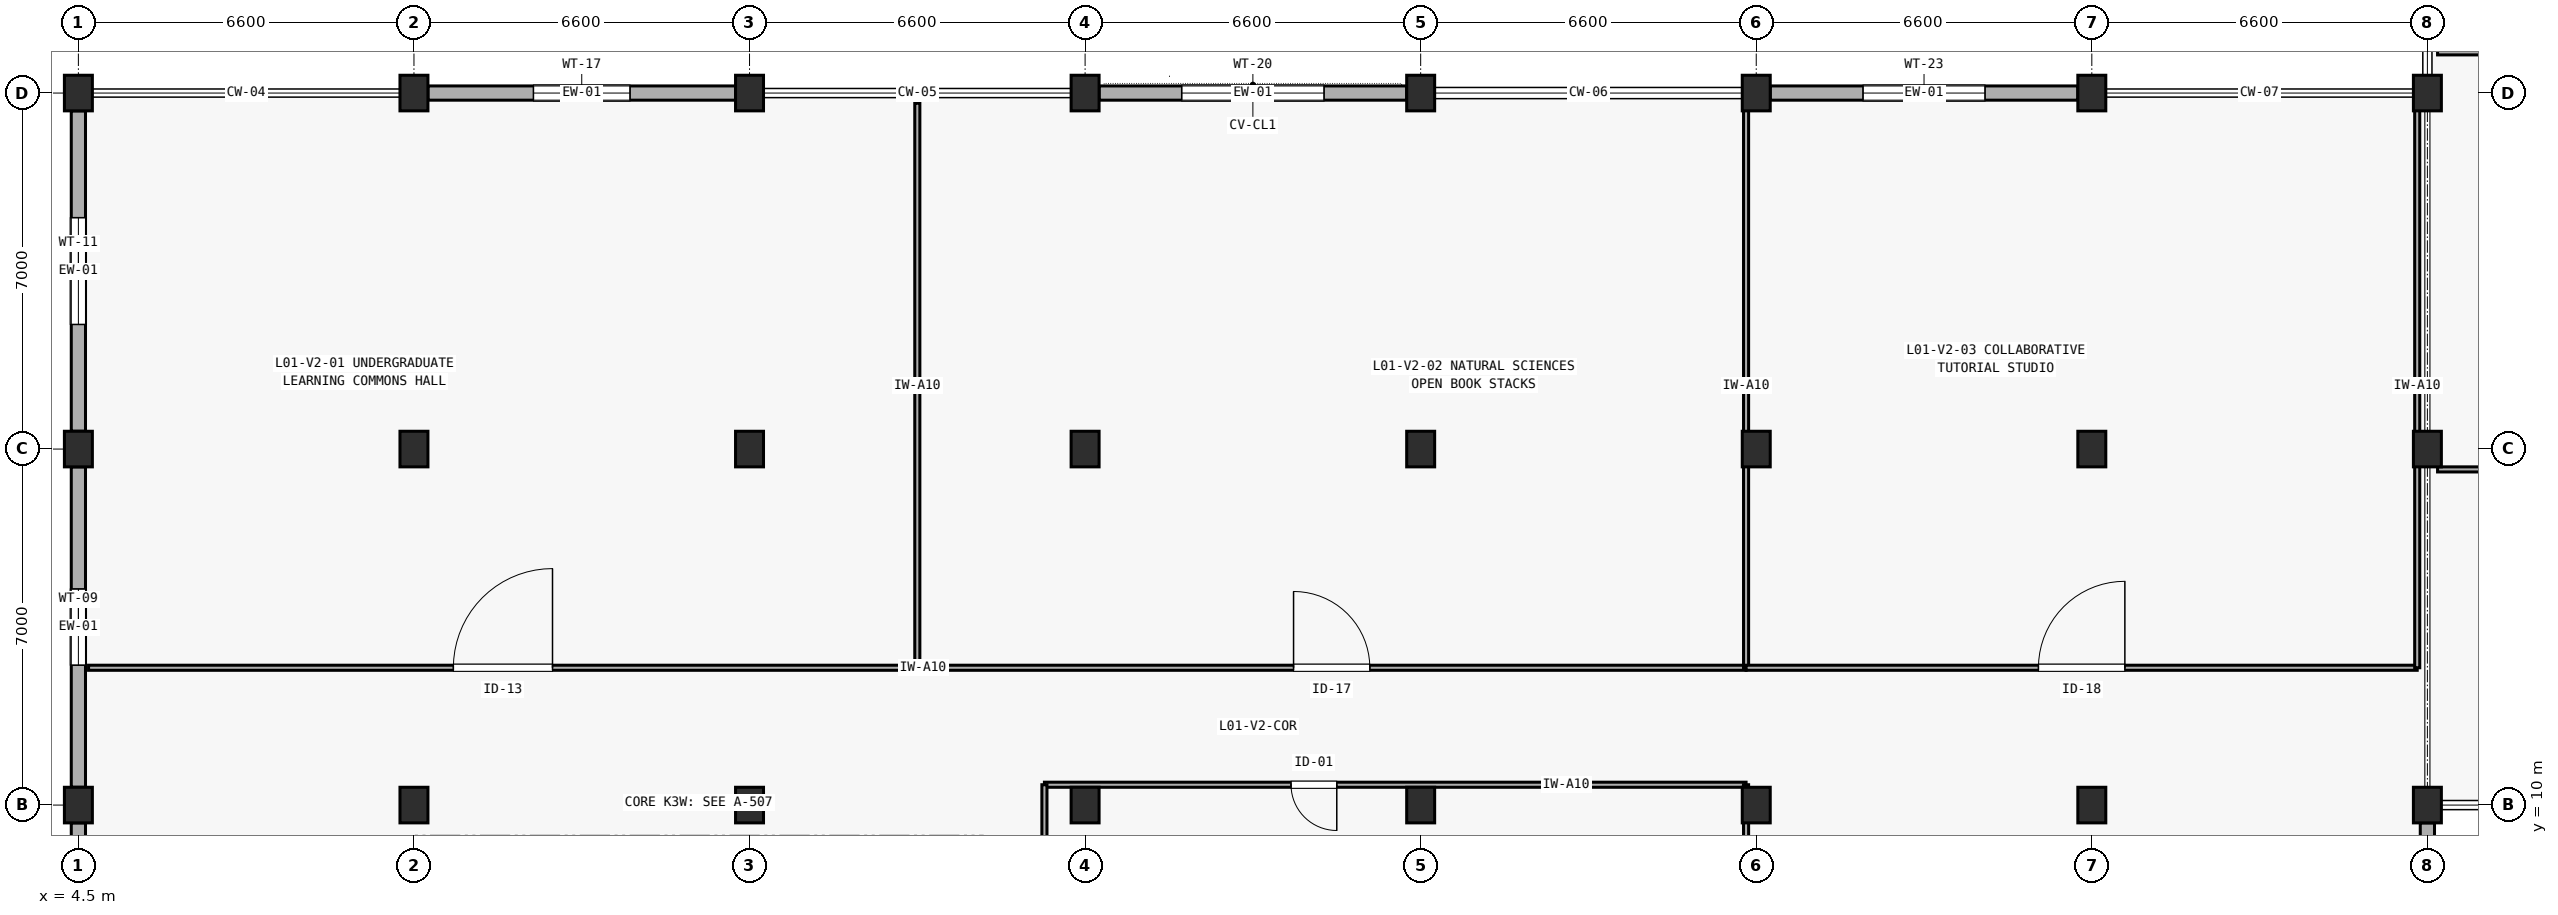
"""IFC4 building model, lengths in metres.
Left out: names, types, materials, properties, quantities, classifications, styles, units other than length and angle.
Written with IfcOpenShell. Run it as: python <this file> out.ifc"""

import sys

from ifc_helpers import new_model, si_unit, direction, frame, frame_2d, origin, origin_2d, place, context, subcontext, project, spatial, rectangle, extrude, element, fill, save


model = new_model("IFC4")
c1 = context("Model", 3, precision=1e-05, world=origin(), true_north=direction((0.0, 1.0)))
c2 = subcontext(c1, "Body", "Model", "MODEL_VIEW")
j1 = project(units=[si_unit("LENGTHUNIT", "METRE"), si_unit("PLANEANGLEUNIT", "RADIAN")], contexts=[c1])
p1 = place(None, origin())
s1 = spatial("IfcSite", under=j1, at=p1, CompositionType="ELEMENT")
p2 = place(p1, origin())
s2 = spatial("IfcBuilding", under=s1, at=p2, CompositionType="ELEMENT")
p3 = place(p2, frame((0.0, 0.0, 4.2)))
s3 = spatial("IfcBuildingStorey", under=s2, at=p3, CompositionType="ELEMENT", Elevation=4.2)
for number, where, z_axis, x_axis in (
    (1, (4.5, 10.0, 0.0), (0.0, 0.0, 1.0), (1.0, 0.0, 0.0)),
    (2, (4.5, 17.0, 0.0), (0.0, 0.0, 1.0), (1.0, 0.0, 0.0)),
    (3, (4.5, 24.0, 0.0), (0.0, 0.0, 1.0), (1.0, 0.0, 0.0)),
    (4, (11.1, 10.0, 0.0), (0.0, 0.0, 1.0), (1.0, 0.0, 0.0)),
    (5, (11.1, 17.0, 0.0), (0.0, 0.0, 1.0), (1.0, 0.0, 0.0)),
    (6, (11.1, 24.0, 0.0), (0.0, 0.0, 1.0), (1.0, 0.0, 0.0)),
    (7, (17.7, 10.0, 0.0), (0.0, 0.0, 1.0), (1.0, 0.0, 0.0)),
    (8, (17.7, 17.0, 0.0), (0.0, 0.0, 1.0), (1.0, 0.0, 0.0)),
    (9, (17.7, 24.0, 0.0), (0.0, 0.0, 1.0), (1.0, 0.0, 0.0)),
    (10, (24.3, 10.0, 0.0), (0.0, 0.0, 1.0), (1.0, 0.0, 0.0)),
    (11, (24.3, 17.0, 0.0), (0.0, 0.0, 1.0), (1.0, 0.0, 0.0)),
    (12, (24.3, 24.0, 0.0), (0.0, 0.0, 1.0), (1.0, 0.0, 0.0)),
    (13, (30.9, 10.0, 0.0), (0.0, 0.0, 1.0), (1.0, 0.0, 0.0)),
    (14, (30.9, 17.0, 0.0), (0.0, 0.0, 1.0), (1.0, 0.0, 0.0)),
    (15, (30.9, 24.0, 0.0), (0.0, 0.0, 1.0), (1.0, 0.0, 0.0)),
    (16, (37.5, 10.0, 0.0), (0.0, 0.0, 1.0), (1.0, 0.0, 0.0)),
    (17, (37.5, 17.0, 0.0), (0.0, 0.0, 1.0), (1.0, 0.0, 0.0)),
    (18, (37.5, 24.0, 0.0), (0.0, 0.0, 1.0), (1.0, 0.0, 0.0)),
    (19, (44.1, 10.0, 0.0), (0.0, 0.0, 1.0), (1.0, 0.0, 0.0)),
    (20, (44.1, 17.0, 0.0), (0.0, 0.0, 1.0), (1.0, 0.0, 0.0)),
    (21, (44.1, 24.0, 0.0), (0.0, 0.0, 1.0), (1.0, 0.0, 0.0)),
    (22, (50.7, 10.0, 0.0), (0.0, 0.0, 1.0), (1.0, 0.0, 0.0)),
    (23, (50.7, 17.0, 0.0), (0.0, 0.0, 1.0), (1.0, 0.0, 0.0)),
    (24, (50.7, 24.0, 0.0), (0.0, 0.0, 1.0), (1.0, 0.0, 0.0)),
):
    element("IfcColumn", number, at=place(p3, frame(where, z_axis=z_axis, x_axis=x_axis)), inside=s3, PredefinedType="COLUMN", context=c2, shape_type="SweptSolid", body=[
        extrude(rectangle(XDim=0.55, YDim=0.7, at=origin_2d()), origin(), (0.0, 0.0, 1.0), 4.2),
    ])
p4 = place(p3, frame((11.375, 24.0, 0.0), z_axis=(0.0, 0.0, 1.0), x_axis=(1.0, 0.0, 0.0)))
e25 = element("IfcWall", 25, at=p4, inside=s3, PredefinedType="SOLIDWALL", context=c2, shape_type="SweptSolid", body=[
    extrude(rectangle(XDim=6.05, YDim=0.28, at=frame_2d((3.025, 0.0))), origin(), (0.0, 0.0, 1.0), 3.235),
])
p5 = place(p4, frame((2.075, 0.0, 0.85)))
e26 = element("IfcOpeningElement", 26, at=p5, cuts=e25, PredefinedType="OPENING", context=c2, shape_type="SweptSolid", body=[
    extrude(rectangle(XDim=1.9, YDim=1.25, at=frame_2d((0.95, 0.625))), frame((0.0, 0.15, 0.0), z_axis=(0.0, -1.0, 0.0), x_axis=(1.0, 0.0, 0.0)), (0.0, 0.0, 1.0), 0.3),
])
p6 = place(p3, frame((24.575, 24.0, 0.0), z_axis=(0.0, 0.0, 1.0), x_axis=(1.0, 0.0, 0.0)))
e27 = element("IfcWall", 27, at=p6, inside=s3, PredefinedType="SOLIDWALL", context=c2, shape_type="SweptSolid", body=[
    extrude(rectangle(XDim=6.05, YDim=0.28, at=frame_2d((3.025, 0.0))), origin(), (0.0, 0.0, 1.0), 3.285),
])
p7 = place(p6, frame((1.625, 0.0, 0.85)))
e28 = element("IfcOpeningElement", 28, at=p7, cuts=e27, PredefinedType="OPENING", context=c2, shape_type="SweptSolid", body=[
    extrude(rectangle(XDim=2.8, YDim=1.25, at=frame_2d((1.4, 0.625))), frame((0.0, 0.15, 0.0), z_axis=(0.0, -1.0, 0.0), x_axis=(1.0, 0.0, 0.0)), (0.0, 0.0, 1.0), 0.3),
])
p8 = place(p3, frame((37.775, 24.0, 0.0), z_axis=(0.0, 0.0, 1.0), x_axis=(1.0, 0.0, 0.0)))
e29 = element("IfcWall", 29, at=p8, inside=s3, PredefinedType="SOLIDWALL", context=c2, shape_type="SweptSolid", body=[
    extrude(rectangle(XDim=6.05, YDim=0.28, at=frame_2d((3.025, 0.0))), origin(), (0.0, 0.0, 1.0), 3.385),
])
p9 = place(p8, frame((1.825, 0.0, 0.85)))
e30 = element("IfcOpeningElement", 30, at=p9, cuts=e29, PredefinedType="OPENING", context=c2, shape_type="SweptSolid", body=[
    extrude(rectangle(XDim=2.4, YDim=1.6, at=frame_2d((1.2, 0.8))), frame((0.0, 0.15, 0.0), z_axis=(0.0, -1.0, 0.0), x_axis=(1.0, 0.0, 0.0)), (0.0, 0.0, 1.0), 0.3),
])
p10 = place(p3, frame((4.5, 3.35, 0.0), z_axis=(0.0, 0.0, 1.0), x_axis=(0.0, 1.0, 0.0)))
e31 = element("IfcWall", 31, at=p10, inside=s3, PredefinedType="SOLIDWALL", context=c2, shape_type="SweptSolid", body=[
    extrude(rectangle(XDim=6.3, YDim=0.28, at=frame_2d((3.15, 0.0))), origin(), (0.0, 0.0, 1.0), 3.565),
])
p11 = place(p10, frame((1.95, 0.0, 0.85)))
e32 = element("IfcOpeningElement", 32, at=p11, cuts=e31, PredefinedType="OPENING", context=c2, shape_type="SweptSolid", body=[
    extrude(rectangle(XDim=2.4, YDim=1.35, at=frame_2d((1.2, 0.675))), frame((0.0, 0.15, 0.0), z_axis=(0.0, -1.0, 0.0), x_axis=(1.0, 0.0, 0.0)), (0.0, 0.0, 1.0), 0.3),
])
p12 = place(p3, frame((4.5, 10.35, 0.0), z_axis=(0.0, 0.0, 1.0), x_axis=(0.0, 1.0, 0.0)))
e33 = element("IfcWall", 33, at=p12, inside=s3, PredefinedType="SOLIDWALL", context=c2, shape_type="SweptSolid", body=[
    extrude(rectangle(XDim=6.3, YDim=0.28, at=frame_2d((3.15, 0.0))), origin(), (0.0, 0.0, 1.0), 3.565),
])
p13 = place(p12, frame((2.4, 0.0, 0.85)))
e34 = element("IfcOpeningElement", 34, at=p13, cuts=e33, PredefinedType="OPENING", context=c2, shape_type="SweptSolid", body=[
    extrude(rectangle(XDim=1.5, YDim=1.5, at=frame_2d((0.75, 0.75))), frame((0.0, 0.15, 0.0), z_axis=(0.0, -1.0, 0.0), x_axis=(1.0, 0.0, 0.0)), (0.0, 0.0, 1.0), 0.3),
])
p14 = place(p3, frame((4.5, 17.35, 0.0), z_axis=(0.0, 0.0, 1.0), x_axis=(0.0, 1.0, 0.0)))
e35 = element("IfcWall", 35, at=p14, inside=s3, PredefinedType="SOLIDWALL", context=c2, shape_type="SweptSolid", body=[
    extrude(rectangle(XDim=6.3, YDim=0.28, at=frame_2d((3.15, 0.0))), origin(), (0.0, 0.0, 1.0), 3.565),
])
p15 = place(p14, frame((2.1, 0.0, 0.85)))
e36 = element("IfcOpeningElement", 36, at=p15, cuts=e35, PredefinedType="OPENING", context=c2, shape_type="SweptSolid", body=[
    extrude(rectangle(XDim=2.1, YDim=1.5, at=frame_2d((1.05, 0.75))), frame((0.0, 0.15, 0.0), z_axis=(0.0, -1.0, 0.0), x_axis=(1.0, 0.0, 0.0)), (0.0, 0.0, 1.0), 0.3),
])
p16 = place(p3, frame((50.7, 3.35, 0.0), z_axis=(0.0, 0.0, 1.0), x_axis=(0.0, 1.0, 0.0)))
e37 = element("IfcWall", 37, at=p16, inside=s3, PredefinedType="SOLIDWALL", context=c2, shape_type="SweptSolid", body=[
    extrude(rectangle(XDim=6.3, YDim=0.28, at=frame_2d((3.15, 0.0))), origin(), (0.0, 0.0, 1.0), 3.465),
])
p17 = place(p16, frame((1.8, 0.0, 0.85)))
e38 = element("IfcOpeningElement", 38, at=p17, cuts=e37, PredefinedType="OPENING", context=c2, shape_type="SweptSolid", body=[
    extrude(rectangle(XDim=2.7, YDim=1.5, at=frame_2d((1.35, 0.75))), frame((0.0, 0.15, 0.0), z_axis=(0.0, -1.0, 0.0), x_axis=(1.0, 0.0, 0.0)), (0.0, 0.0, 1.0), 0.3),
])
p18 = place(p3, frame((4.7, 12.7, 0.0), z_axis=(0.0, 0.0, 1.0), x_axis=(1.0, 0.0, 0.0)))
e39 = element("IfcWall", 39, at=p18, inside=s3, PredefinedType="PARTITIONING", context=c2, shape_type="SweptSolid", body=[
    extrude(rectangle(XDim=16.3, YDim=0.1, at=frame_2d((8.15, 0.0))), origin(), (0.0, 0.0, 1.0), 3.9),
])
p19 = place(p18, frame((7.175, 0.0, 0.0)))
e40 = element("IfcOpeningElement", 40, at=p19, cuts=e39, PredefinedType="OPENING", context=c2, shape_type="SweptSolid", body=[
    extrude(rectangle(XDim=1.95, YDim=2.3, at=frame_2d((0.975, 1.15))), frame((0.0, 0.06, 0.0), z_axis=(0.0, -1.0, 0.0), x_axis=(1.0, 0.0, 0.0)), (0.0, 0.0, 1.0), 0.12),
])
p20 = place(p3, frame((21.0, 12.7, 0.0), z_axis=(0.0, 0.0, 1.0), x_axis=(0.0, 1.0, 0.0)))
e41 = element("IfcWall", 41, at=p20, inside=s3, PredefinedType="PARTITIONING", context=c2, shape_type="SweptSolid", body=[
    extrude(rectangle(XDim=11.1, YDim=0.1, at=frame_2d((5.55, 0.0))), origin(), (0.0, 0.0, 1.0), 3.618),
])
p21 = place(p3, frame((21.0, 12.7, 0.0), z_axis=(0.0, 0.0, 1.0), x_axis=(1.0, 0.0, 0.0)))
e42 = element("IfcWall", 42, at=p21, inside=s3, PredefinedType="PARTITIONING", context=c2, shape_type="SweptSolid", body=[
    extrude(rectangle(XDim=16.3, YDim=0.1, at=frame_2d((8.15, 0.0))), origin(), (0.0, 0.0, 1.0), 3.9),
])
p22 = place(p21, frame((7.4, 0.0, 0.0)))
e43 = element("IfcOpeningElement", 43, at=p22, cuts=e42, PredefinedType="OPENING", context=c2, shape_type="SweptSolid", body=[
    extrude(rectangle(XDim=1.5, YDim=2.15, at=frame_2d((0.75, 1.075))), frame((0.0, 0.06, 0.0), z_axis=(0.0, -1.0, 0.0), x_axis=(1.0, 0.0, 0.0)), (0.0, 0.0, 1.0), 0.12),
])
p23 = place(p3, frame((37.3, 12.7, 0.0), z_axis=(0.0, 0.0, 1.0), x_axis=(0.0, 1.0, 0.0)))
e44 = element("IfcWall", 44, at=p23, inside=s3, PredefinedType="PARTITIONING", context=c2, shape_type="SweptSolid", body=[
    extrude(rectangle(XDim=11.1, YDim=0.1, at=frame_2d((5.55, 0.0))), origin(), (0.0, 0.0, 1.0), 3.445),
])
p24 = place(p3, frame((37.3, 12.7, 0.0), z_axis=(0.0, 0.0, 1.0), x_axis=(1.0, 0.0, 0.0)))
e45 = element("IfcWall", 45, at=p24, inside=s3, PredefinedType="PARTITIONING", context=c2, shape_type="SweptSolid", body=[
    extrude(rectangle(XDim=13.2, YDim=0.1, at=frame_2d((6.6, 0.0))), origin(), (0.0, 0.0, 1.0), 3.9),
])
p25 = place(p24, frame((5.75, 0.0, 0.0)))
e46 = element("IfcOpeningElement", 46, at=p25, cuts=e45, PredefinedType="OPENING", context=c2, shape_type="SweptSolid", body=[
    extrude(rectangle(XDim=1.7, YDim=2.2, at=frame_2d((0.85, 1.1))), frame((0.0, 0.06, 0.0), z_axis=(0.0, -1.0, 0.0), x_axis=(1.0, 0.0, 0.0)), (0.0, 0.0, 1.0), 0.12),
])
p26 = place(p3, frame((50.5, 12.7, 0.0), z_axis=(0.0, 0.0, 1.0), x_axis=(0.0, 1.0, 0.0)))
e47 = element("IfcWall", 47, at=p26, inside=s3, PredefinedType="PARTITIONING", context=c2, shape_type="SweptSolid", body=[
    extrude(rectangle(XDim=11.1, YDim=0.1, at=frame_2d((5.55, 0.0))), origin(), (0.0, 0.0, 1.0), 3.445),
])
p27 = place(p3, frame((23.5, 10.4, 0.0), z_axis=(0.0, 0.0, 1.0), x_axis=(1.0, 0.0, 0.0)))
e48 = element("IfcWall", 48, at=p27, inside=s3, PredefinedType="PARTITIONING", context=c2, shape_type="SweptSolid", body=[
    extrude(rectangle(XDim=13.8, YDim=0.1, at=frame_2d((6.9, 0.0))), origin(), (0.0, 0.0, 1.0), 3.9),
])
p28 = place(p27, frame((4.85, 0.0, 0.0)))
e49 = element("IfcOpeningElement", 49, at=p28, cuts=e48, PredefinedType="OPENING", context=c2, shape_type="SweptSolid", body=[
    extrude(rectangle(XDim=0.9, YDim=2.1, at=frame_2d((0.45, 1.05))), frame((0.0, 0.06, 0.0), z_axis=(0.0, -1.0, 0.0), x_axis=(1.0, 0.0, 0.0)), (0.0, 0.0, 1.0), 0.12),
])
for number, where, z_axis, x_axis in (
    (50, (23.5, 3.2, 0.0), (0.0, 0.0, 1.0), (0.0, 1.0, 0.0)),
    (51, (37.3, 3.2, 0.0), (0.0, 0.0, 1.0), (0.0, 1.0, 0.0)),
):
    element("IfcWall", number, at=place(p3, frame(where, z_axis=z_axis, x_axis=x_axis)), inside=s3, PredefinedType="PARTITIONING", context=c2, shape_type="SweptSolid", body=[
        extrude(rectangle(XDim=7.2, YDim=0.1, at=frame_2d((3.6, 0.0))), origin(), (0.0, 0.0, 1.0), 3.9),
    ])
p29 = place(p3, frame((50.9, 16.6, 0.0), z_axis=(0.0, 0.0, 1.0), x_axis=(1.0, 0.0, 0.0)))
e52 = element("IfcWall", 52, at=p29, inside=s3, PredefinedType="PARTITIONING", context=c2, shape_type="SweptSolid", body=[
    extrude(rectangle(XDim=16.6, YDim=0.1, at=frame_2d((8.3, 0.0))), origin(), (0.0, 0.0, 1.0), 3.135),
])
p30 = place(p3, frame((50.9, 24.8, 0.0), z_axis=(0.0, 0.0, 1.0), x_axis=(1.0, 0.0, 0.0)))
e53 = element("IfcWall", 53, at=p30, inside=s3, PredefinedType="PARTITIONING", context=c2, shape_type="SweptSolid", body=[
    extrude(rectangle(XDim=16.6, YDim=0.1, at=frame_2d((8.3, 0.0))), origin(), (0.0, 0.0, 1.0), 3.9),
])
p31 = place(p30, frame((7.875, 0.0, 0.0)))
e54 = element("IfcOpeningElement", 54, at=p31, cuts=e53, PredefinedType="OPENING", context=c2, shape_type="SweptSolid", body=[
    extrude(rectangle(XDim=1.25, YDim=2.15, at=frame_2d((0.625, 1.075))), frame((0.0, 0.06, 0.0), z_axis=(0.0, -1.0, 0.0), x_axis=(1.0, 0.0, 0.0)), (0.0, 0.0, 1.0), 0.12),
])
p32 = place(p5, origin())
e55 = element("IfcWindow", 55, at=p32, inside=s3, PartitioningType="SINGLE_PANEL", PredefinedType="WINDOW", context=c2, shape_type="SweptSolid", body=[
    extrude(rectangle(XDim=1.9, YDim=1.25, at=frame_2d((0.95, 0.625))), frame((0.0, 0.03, 0.0), z_axis=(0.0, -1.0, 0.0), x_axis=(1.0, 0.0, 0.0)), (0.0, 0.0, 1.0), 0.06),
])
fill(e26, e55)
p33 = place(p7, origin())
e56 = element("IfcWindow", 56, at=p33, inside=s3, PartitioningType="SINGLE_PANEL", PredefinedType="WINDOW", context=c2, shape_type="SweptSolid", body=[
    extrude(rectangle(XDim=2.8, YDim=1.25, at=frame_2d((1.4, 0.625))), frame((0.0, 0.03, 0.0), z_axis=(0.0, -1.0, 0.0), x_axis=(1.0, 0.0, 0.0)), (0.0, 0.0, 1.0), 0.06),
])
fill(e28, e56)
p34 = place(p9, origin())
e57 = element("IfcWindow", 57, at=p34, inside=s3, PartitioningType="SINGLE_PANEL", PredefinedType="WINDOW", context=c2, shape_type="SweptSolid", body=[
    extrude(rectangle(XDim=2.4, YDim=1.6, at=frame_2d((1.2, 0.8))), frame((0.0, 0.03, 0.0), z_axis=(0.0, -1.0, 0.0), x_axis=(1.0, 0.0, 0.0)), (0.0, 0.0, 1.0), 0.06),
])
fill(e30, e57)
p35 = place(p13, origin())
e58 = element("IfcWindow", 58, at=p35, inside=s3, PartitioningType="SINGLE_PANEL", PredefinedType="WINDOW", context=c2, shape_type="SweptSolid", body=[
    extrude(rectangle(XDim=1.5, YDim=1.5, at=frame_2d((0.75, 0.75))), frame((0.0, 0.03, 0.0), z_axis=(0.0, -1.0, 0.0), x_axis=(1.0, 0.0, 0.0)), (0.0, 0.0, 1.0), 0.06),
])
fill(e34, e58)
p36 = place(p15, origin())
e59 = element("IfcWindow", 59, at=p36, inside=s3, PartitioningType="SINGLE_PANEL", PredefinedType="WINDOW", context=c2, shape_type="SweptSolid", body=[
    extrude(rectangle(XDim=2.1, YDim=1.5, at=frame_2d((1.05, 0.75))), frame((0.0, 0.03, 0.0), z_axis=(0.0, -1.0, 0.0), x_axis=(1.0, 0.0, 0.0)), (0.0, 0.0, 1.0), 0.06),
])
fill(e36, e59)
p37 = place(p19, origin())
e60 = element("IfcDoor", 60, at=p37, inside=s3, OperationType="SINGLE_SWING_RIGHT", PredefinedType="DOOR", context=c2, shape_type="SweptSolid", body=[
    extrude(rectangle(XDim=1.95, YDim=2.3, at=frame_2d((0.975, 1.15))), frame((0.0, 0.025, 0.0), z_axis=(0.0, -1.0, 0.0), x_axis=(1.0, 0.0, 0.0)), (0.0, 0.0, 1.0), 0.05),
])
fill(e40, e60)
p38 = place(p22, origin())
e61 = element("IfcDoor", 61, at=p38, inside=s3, OperationType="SINGLE_SWING_LEFT", PredefinedType="DOOR", context=c2, shape_type="SweptSolid", body=[
    extrude(rectangle(XDim=1.5, YDim=2.15, at=frame_2d((0.75, 1.075))), frame((0.0, 0.025, 0.0), z_axis=(0.0, -1.0, 0.0), x_axis=(1.0, 0.0, 0.0)), (0.0, 0.0, 1.0), 0.05),
])
fill(e43, e61)
p39 = place(p25, origin())
e62 = element("IfcDoor", 62, at=p39, inside=s3, OperationType="SINGLE_SWING_RIGHT", PredefinedType="DOOR", context=c2, shape_type="SweptSolid", body=[
    extrude(rectangle(XDim=1.7, YDim=2.2, at=frame_2d((0.85, 1.1))), frame((0.0, 0.025, 0.0), z_axis=(0.0, -1.0, 0.0), x_axis=(1.0, 0.0, 0.0)), (0.0, 0.0, 1.0), 0.05),
])
fill(e46, e62)
p40 = place(p28, frame((0.9, 0.0, 0.0), z_axis=(0.0, 0.0, 1.0), x_axis=(-1.0, 0.0, 0.0)))
e63 = element("IfcDoor", 63, at=p40, inside=s3, OperationType="SINGLE_SWING_LEFT", PredefinedType="DOOR", context=c2, shape_type="SweptSolid", body=[
    extrude(rectangle(XDim=0.9, YDim=2.1, at=frame_2d((0.45, 1.05))), frame((0.0, 0.025, 0.0), z_axis=(0.0, -1.0, 0.0), x_axis=(1.0, 0.0, 0.0)), (0.0, 0.0, 1.0), 0.05),
])
fill(e49, e63)
save(model, sys.argv[1])
